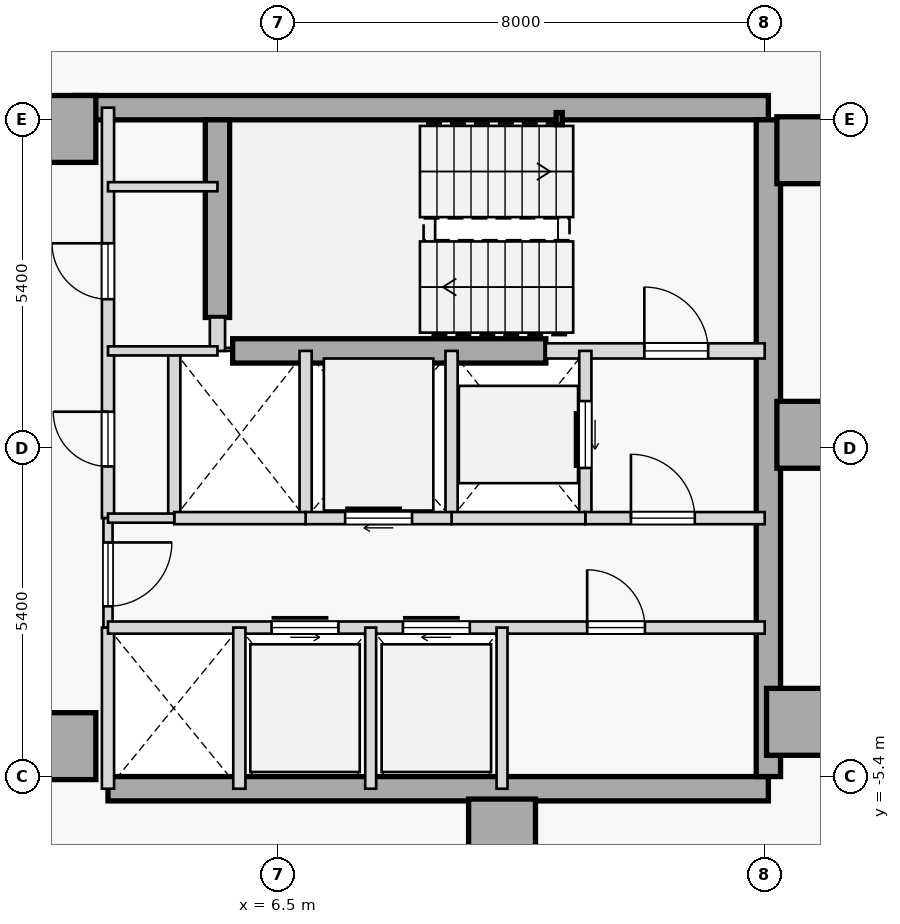
"""IFC4 building model, lengths in metres.
Left out: names, types, materials, properties, quantities, classifications, styles, units other than length and angle.
Written with IfcOpenShell. Run it as: python <this file> out.ifc"""

import sys

from ifc_helpers import new_model, si_unit, direction, frame, frame_2d, origin, origin_2d, place, context, subcontext, project, spatial, rectangle, hollow_rectangle, extrude, element, fill, save


model = new_model("IFC4")
c1 = context("Model", 3, precision=1e-05, world=origin(), true_north=direction((0.0, 1.0)))
c2 = subcontext(c1, "Body", "Model", "MODEL_VIEW")
j1 = project(units=[si_unit("LENGTHUNIT", "METRE"), si_unit("PLANEANGLEUNIT", "RADIAN")], contexts=[c1])
p1 = place(None, origin())
s1 = spatial("IfcSite", under=j1, at=p1, CompositionType="ELEMENT")
p2 = place(p1, origin())
s2 = spatial("IfcBuilding", under=s1, at=p2, CompositionType="ELEMENT")
p3 = place(p2, frame((0.0, 0.0, 178.6)))
s3 = spatial("IfcBuildingStorey", under=s2, at=p3, CompositionType="ELEMENT", Elevation=178.6)
for number, where, z_axis, x_axis in (
    (1, (15.25, 4.9, 0.0), (0.0, 0.0, 1.0), (1.0, 0.0, 0.0)),
    (2, (15.25, 0.22, 0.0), (0.0, 0.0, 1.0), (1.0, 0.0, 0.0)),
    (3, (15.08, -4.5, 0.0), (0.0, 0.0, 1.0), (1.0, 0.0, 0.0)),
    (4, (10.18, -6.32, 0.0), (0.0, 0.0, 1.0), (1.0, 0.0, 0.0)),
    (5, (2.95, -4.9, 0.0), (0.0, 0.0, 1.0), (1.0, 0.0, 0.0)),
    (6, (2.95, 5.25, 0.0), (0.0, 0.0, 1.0), (1.0, 0.0, 0.0)),
):
    element("IfcColumn", number, at=place(p3, frame(where, z_axis=z_axis, x_axis=x_axis)), inside=s3, PredefinedType="COLUMN", context=c2, shape_type="SweptSolid", body=[
        extrude(rectangle(XDim=1.1, YDim=1.1, at=origin_2d()), origin(), (0.0, 0.0, 1.0), 3.4),
    ])
p4 = place(p3, frame((3.15, 5.6, 0.0), z_axis=(0.0, 0.0, 1.0), x_axis=(1.0, 0.0, 0.0)))
e7 = element("IfcWall", 7, at=p4, inside=s3, PredefinedType="SHEAR", context=c2, shape_type="SweptSolid", body=[
    extrude(rectangle(XDim=11.41, YDim=0.4, at=frame_2d((5.705, 0.0))), origin(), (0.0, 0.0, 1.0), 3.175),
])
p5 = place(p3, frame((3.7, -5.6, 0.0), z_axis=(0.0, 0.0, 1.0), x_axis=(1.0, 0.0, 0.0)))
e8 = element("IfcWall", 8, at=p5, inside=s3, PredefinedType="SHEAR", context=c2, shape_type="SweptSolid", body=[
    extrude(rectangle(XDim=10.86, YDim=0.4, at=frame_2d((5.43, 0.0))), origin(), (0.0, 0.0, 1.0), 3.175),
])
p6 = place(p3, frame((14.56, -5.4, 0.0), z_axis=(0.0, 0.0, 1.0), x_axis=(0.0, 1.0, 0.0)))
e9 = element("IfcWall", 9, at=p6, inside=s3, PredefinedType="SHEAR", context=c2, shape_type="SweptSolid", body=[
    extrude(rectangle(XDim=10.8, YDim=0.4, at=frame_2d((5.4, 0.0))), origin(), (0.0, 0.0, 1.0), 3.175),
])
p7 = place(p3, frame((5.5, 2.15, 0.0), z_axis=(0.0, 0.0, 1.0), x_axis=(0.0, 1.0, 0.0)))
e10 = element("IfcWall", 10, at=p7, inside=s3, PredefinedType="SHEAR", context=c2, shape_type="SweptSolid", body=[
    extrude(rectangle(XDim=3.25, YDim=0.4, at=frame_2d((1.625, 0.0))), origin(), (0.0, 0.0, 1.0), 3.175),
])
p8 = place(p3, frame((5.75, 1.6, 0.0), z_axis=(0.0, 0.0, 1.0), x_axis=(1.0, 0.0, 0.0)))
e11 = element("IfcWall", 11, at=p8, inside=s3, PredefinedType="SHEAR", context=c2, shape_type="SweptSolid", body=[
    extrude(rectangle(XDim=5.15, YDim=0.4, at=frame_2d((2.575, 0.0))), origin(), (0.0, 0.0, 1.0), 3.175),
])
p9 = place(p3, frame((11.12, 5.42, 0.0), z_axis=(0.0, 0.0, 1.0), x_axis=(1.0, 0.0, 0.0)))
e12 = element("IfcColumn", 12, at=p9, inside=s3, PredefinedType="COLUMN", context=c2, shape_type="SweptSolid", body=[
    extrude(hollow_rectangle(XDim=0.1, YDim=0.2, WallThickness=0.008, at=origin_2d()), origin(), (0.0, 0.0, 1.0), 3.4),
])
p10 = place(p3, frame((10.9, 1.6, 0.0), z_axis=(0.0, 0.0, 1.0), x_axis=(1.0, 0.0, 0.0)))
e13 = element("IfcWall", 13, at=p10, inside=s3, PredefinedType="STANDARD", context=c2, shape_type="SweptSolid", body=[
    extrude(rectangle(XDim=3.6, YDim=0.25, at=frame_2d((1.8, 0.0))), origin(), (0.0, 0.0, 1.0), 3.175),
])
p11 = place(p10, frame((1.62, 0.0, 0.0)))
e14 = element("IfcOpeningElement", 14, at=p11, cuts=e13, PredefinedType="OPENING", context=c2, shape_type="SweptSolid", body=[
    extrude(rectangle(XDim=1.05, YDim=2.15, at=frame_2d((0.525, 1.075))), frame((0.0, 0.135, 0.0), z_axis=(0.0, -1.0, 0.0), x_axis=(1.0, 0.0, 0.0)), (0.0, 0.0, 1.0), 0.27),
])
p12 = place(p3, frame((5.5, 1.6, 0.0), z_axis=(0.0, 0.0, 1.0), x_axis=(0.0, 1.0, 0.0)))
e15 = element("IfcWall", 15, at=p12, inside=s3, PredefinedType="STANDARD", context=c2, shape_type="SweptSolid", body=[
    extrude(rectangle(XDim=0.55, YDim=0.25, at=frame_2d((0.275, 0.0))), origin(), (0.0, 0.0, 1.0), 3.175),
])
p13 = place(p3, frame((3.7, -1.15, 0.0), z_axis=(0.0, 0.0, 1.0), x_axis=(0.0, 1.0, 0.0)))
e16 = element("IfcWall", 16, at=p13, inside=s3, PredefinedType="STANDARD", context=c2, shape_type="SweptSolid", body=[
    extrude(rectangle(XDim=6.75, YDim=0.2, at=frame_2d((3.375, 0.0))), origin(), (0.0, 0.0, 1.0), 3.175),
])
p14 = place(p13, frame((3.6, 0.0, 0.0)))
e17 = element("IfcOpeningElement", 17, at=p14, cuts=e16, PredefinedType="OPENING", context=c2, shape_type="SweptSolid", body=[
    extrude(rectangle(XDim=0.92, YDim=2.15, at=frame_2d((0.46, 1.075))), frame((0.0, 0.11, 0.0), z_axis=(0.0, -1.0, 0.0), x_axis=(1.0, 0.0, 0.0)), (0.0, 0.0, 1.0), 0.22),
])
p15 = place(p13, frame((0.85, 0.0, 0.0)))
e18 = element("IfcOpeningElement", 18, at=p15, cuts=e16, PredefinedType="OPENING", context=c2, shape_type="SweptSolid", body=[
    extrude(rectangle(XDim=0.9, YDim=2.15, at=frame_2d((0.45, 1.075))), frame((0.0, 0.11, 0.0), z_axis=(0.0, -1.0, 0.0), x_axis=(1.0, 0.0, 0.0)), (0.0, 0.0, 1.0), 0.22),
])
p16 = place(p3, frame((3.7, -2.95, 0.0), z_axis=(0.0, 0.0, 1.0), x_axis=(0.0, 1.0, 0.0)))
e19 = element("IfcWall", 19, at=p16, inside=s3, PredefinedType="PARTITIONING", context=c2, shape_type="SweptSolid", body=[
    extrude(rectangle(XDim=1.8, YDim=0.15, at=frame_2d((0.9, 0.0))), origin(), (0.0, 0.0, 1.0), 3.175),
])
p17 = place(p16, frame((0.35, 0.0, 0.0)))
e20 = element("IfcOpeningElement", 20, at=p17, cuts=e19, PredefinedType="OPENING", context=c2, shape_type="SweptSolid", body=[
    extrude(rectangle(XDim=1.05, YDim=2.18, at=frame_2d((0.525, 1.09))), frame((0.0, 0.085, 0.0), z_axis=(0.0, -1.0, 0.0), x_axis=(1.0, 0.0, 0.0)), (0.0, 0.0, 1.0), 0.17),
])
p18 = place(p3, frame((3.7, -5.6, 0.0), z_axis=(0.0, 0.0, 1.0), x_axis=(0.0, 1.0, 0.0)))
e21 = element("IfcWall", 21, at=p18, inside=s3, PredefinedType="STANDARD", context=c2, shape_type="SweptSolid", body=[
    extrude(rectangle(XDim=2.65, YDim=0.2, at=frame_2d((1.325, 0.0))), origin(), (0.0, 0.0, 1.0), 3.175),
])
p19 = place(p3, frame((11.55, -1.15, 0.0), z_axis=(0.0, 0.0, 1.0), x_axis=(0.0, 1.0, 0.0)))
e22 = element("IfcWall", 22, at=p19, inside=s3, PredefinedType="STANDARD", context=c2, shape_type="SweptSolid", body=[
    extrude(rectangle(XDim=2.75, YDim=0.2, at=frame_2d((1.375, 0.0))), origin(), (0.0, 0.0, 1.0), 3.175),
])
p20 = place(p19, frame((0.825, 0.0, 0.0)))
e23 = element("IfcOpeningElement", 23, at=p20, cuts=e22, PredefinedType="OPENING", context=c2, shape_type="SweptSolid", body=[
    extrude(rectangle(XDim=1.1, YDim=2.15, at=frame_2d((0.55, 1.075))), frame((0.0, 0.11, 0.0), z_axis=(0.0, -1.0, 0.0), x_axis=(1.0, 0.0, 0.0)), (0.0, 0.0, 1.0), 0.22),
])
p21 = place(p3, frame((9.35, -1.15, 0.0), z_axis=(0.0, 0.0, 1.0), x_axis=(0.0, 1.0, 0.0)))
e24 = element("IfcWall", 24, at=p21, inside=s3, PredefinedType="STANDARD", context=c2, shape_type="SweptSolid", body=[
    extrude(rectangle(XDim=2.75, YDim=0.2, at=frame_2d((1.375, 0.0))), origin(), (0.0, 0.0, 1.0), 3.175),
])
p22 = place(p3, frame((11.55, -1.15, 0.0), z_axis=(0.0, 0.0, 1.0), x_axis=(1.0, 0.0, 0.0)))
e25 = element("IfcWall", 25, at=p22, inside=s3, PredefinedType="STANDARD", context=c2, shape_type="SweptSolid", body=[
    extrude(rectangle(XDim=2.95, YDim=0.2, at=frame_2d((1.475, 0.0))), origin(), (0.0, 0.0, 1.0), 3.175),
])
p23 = place(p22, frame((0.75, 0.0, 0.0)))
e26 = element("IfcOpeningElement", 26, at=p23, cuts=e25, PredefinedType="OPENING", context=c2, shape_type="SweptSolid", body=[
    extrude(rectangle(XDim=1.05, YDim=2.18, at=frame_2d((0.525, 1.09))), frame((0.0, 0.11, 0.0), z_axis=(0.0, -1.0, 0.0), x_axis=(1.0, 0.0, 0.0)), (0.0, 0.0, 1.0), 0.22),
])
p24 = place(p3, frame((9.35, -1.15, 0.0), z_axis=(0.0, 0.0, 1.0), x_axis=(1.0, 0.0, 0.0)))
e27 = element("IfcWall", 27, at=p24, inside=s3, PredefinedType="STANDARD", context=c2, shape_type="SweptSolid", body=[
    extrude(rectangle(XDim=2.2, YDim=0.2, at=frame_2d((1.1, 0.0))), origin(), (0.0, 0.0, 1.0), 3.175),
])
p25 = place(p3, frame((6.95, -1.15, 0.0), z_axis=(0.0, 0.0, 1.0), x_axis=(0.0, 1.0, 0.0)))
e28 = element("IfcWall", 28, at=p25, inside=s3, PredefinedType="STANDARD", context=c2, shape_type="SweptSolid", body=[
    extrude(rectangle(XDim=2.75, YDim=0.2, at=frame_2d((1.375, 0.0))), origin(), (0.0, 0.0, 1.0), 3.175),
])
p26 = place(p3, frame((6.95, -1.15, 0.0), z_axis=(0.0, 0.0, 1.0), x_axis=(1.0, 0.0, 0.0)))
e29 = element("IfcWall", 29, at=p26, inside=s3, PredefinedType="STANDARD", context=c2, shape_type="SweptSolid", body=[
    extrude(rectangle(XDim=2.4, YDim=0.2, at=frame_2d((1.2, 0.0))), origin(), (0.0, 0.0, 1.0), 3.175),
])
p27 = place(p26, frame((0.65, 0.0, 0.0)))
e30 = element("IfcOpeningElement", 30, at=p27, cuts=e29, PredefinedType="OPENING", context=c2, shape_type="SweptSolid", body=[
    extrude(rectangle(XDim=1.1, YDim=2.15, at=frame_2d((0.55, 1.075))), frame((0.0, 0.11, 0.0), z_axis=(0.0, -1.0, 0.0), x_axis=(1.0, 0.0, 0.0)), (0.0, 0.0, 1.0), 0.22),
])
p28 = place(p3, frame((4.79, -1.15, 0.0), z_axis=(0.0, 0.0, 1.0), x_axis=(0.0, 1.0, 0.0)))
e31 = element("IfcWall", 31, at=p28, inside=s3, PredefinedType="STANDARD", context=c2, shape_type="SweptSolid", body=[
    extrude(rectangle(XDim=2.75, YDim=0.2, at=frame_2d((1.375, 0.0))), origin(), (0.0, 0.0, 1.0), 3.175),
])
p29 = place(p3, frame((4.79, -1.15, 0.0), z_axis=(0.0, 0.0, 1.0), x_axis=(1.0, 0.0, 0.0)))
e32 = element("IfcWall", 32, at=p29, inside=s3, PredefinedType="STANDARD", context=c2, shape_type="SweptSolid", body=[
    extrude(rectangle(XDim=2.16, YDim=0.2, at=frame_2d((1.08, 0.0))), origin(), (0.0, 0.0, 1.0), 3.175),
])
p30 = place(p3, frame((3.7, -1.15, 0.0), z_axis=(0.0, 0.0, 1.0), x_axis=(1.0, 0.0, 0.0)))
e33 = element("IfcWall", 33, at=p30, inside=s3, PredefinedType="PARTITIONING", context=c2, shape_type="SweptSolid", body=[
    extrude(rectangle(XDim=1.09, YDim=0.15, at=frame_2d((0.545, 0.0))), origin(), (0.0, 0.0, 1.0), 3.175),
])
p31 = place(p3, frame((3.7, -2.95, 0.0), z_axis=(0.0, 0.0, 1.0), x_axis=(1.0, 0.0, 0.0)))
e34 = element("IfcWall", 34, at=p31, inside=s3, PredefinedType="STANDARD", context=c2, shape_type="SweptSolid", body=[
    extrude(rectangle(XDim=10.8, YDim=0.2, at=frame_2d((5.4, 0.0))), origin(), (0.0, 0.0, 1.0), 3.175),
])
p32 = place(p31, frame((2.69, 0.0, 0.0)))
e35 = element("IfcOpeningElement", 35, at=p32, cuts=e34, PredefinedType="OPENING", context=c2, shape_type="SweptSolid", body=[
    extrude(rectangle(XDim=1.1, YDim=2.15, at=frame_2d((0.55, 1.075))), frame((0.0, 0.11, 0.0), z_axis=(0.0, -1.0, 0.0), x_axis=(1.0, 0.0, 0.0)), (0.0, 0.0, 1.0), 0.22),
])
p33 = place(p31, frame((4.85, 0.0, 0.0)))
e36 = element("IfcOpeningElement", 36, at=p33, cuts=e34, PredefinedType="OPENING", context=c2, shape_type="SweptSolid", body=[
    extrude(rectangle(XDim=1.1, YDim=2.15, at=frame_2d((0.55, 1.075))), frame((0.0, 0.11, 0.0), z_axis=(0.0, -1.0, 0.0), x_axis=(1.0, 0.0, 0.0)), (0.0, 0.0, 1.0), 0.22),
])
p34 = place(p31, frame((7.88, 0.0, 0.0)))
e37 = element("IfcOpeningElement", 37, at=p34, cuts=e34, PredefinedType="OPENING", context=c2, shape_type="SweptSolid", body=[
    extrude(rectangle(XDim=0.95, YDim=2.15, at=frame_2d((0.475, 1.075))), frame((0.0, 0.11, 0.0), z_axis=(0.0, -1.0, 0.0), x_axis=(1.0, 0.0, 0.0)), (0.0, 0.0, 1.0), 0.22),
])
p35 = place(p3, frame((5.86, -5.6, 0.0), z_axis=(0.0, 0.0, 1.0), x_axis=(0.0, 1.0, 0.0)))
e38 = element("IfcWall", 38, at=p35, inside=s3, PredefinedType="STANDARD", context=c2, shape_type="SweptSolid", body=[
    extrude(rectangle(XDim=2.65, YDim=0.2, at=frame_2d((1.325, 0.0))), origin(), (0.0, 0.0, 1.0), 3.175),
])
for number, where, z_axis, x_axis in (
    (39, (10.18, -5.6, 0.0), (0.0, 0.0, 1.0), (0.0, 1.0, 0.0)),
    (40, (8.02, -5.6, 0.0), (0.0, 0.0, 1.0), (0.0, 1.0, 0.0)),
):
    element("IfcWall", number, at=place(p3, frame(where, z_axis=z_axis, x_axis=x_axis)), inside=s3, PredefinedType="STANDARD", context=c2, shape_type="SweptSolid", body=[
        extrude(rectangle(XDim=2.65, YDim=0.18, at=frame_2d((1.325, 0.0))), origin(), (0.0, 0.0, 1.0), 3.175),
    ])
for number, where, z_axis, x_axis in (
    (41, (3.7, 4.3, 0.0), (0.0, 0.0, 1.0), (1.0, 0.0, 0.0)),
    (42, (3.7, 1.6, 0.0), (0.0, 0.0, 1.0), (1.0, 0.0, 0.0)),
):
    element("IfcWall", number, at=place(p3, frame(where, z_axis=z_axis, x_axis=x_axis)), inside=s3, PredefinedType="PARTITIONING", context=c2, shape_type="SweptSolid", body=[
        extrude(rectangle(XDim=1.8, YDim=0.15, at=frame_2d((0.9, 0.0))), origin(), (0.0, 0.0, 1.0), 3.175),
    ])
p36 = place(p11, origin())
e43 = element("IfcDoor", 43, at=p36, inside=s3, OperationType="SINGLE_SWING_LEFT", PredefinedType="DOOR", context=c2, shape_type="SweptSolid", body=[
    extrude(rectangle(XDim=1.05, YDim=2.15, at=frame_2d((0.525, 1.075))), frame((0.0, 0.025, 0.0), z_axis=(0.0, -1.0, 0.0), x_axis=(1.0, 0.0, 0.0)), (0.0, 0.0, 1.0), 0.05),
])
fill(e14, e43)
p37 = place(p23, origin())
e44 = element("IfcDoor", 44, at=p37, inside=s3, OperationType="SINGLE_SWING_LEFT", PredefinedType="DOOR", context=c2, shape_type="SweptSolid", body=[
    extrude(rectangle(XDim=1.05, YDim=2.18, at=frame_2d((0.525, 1.09))), frame((0.0, 0.025, 0.0), z_axis=(0.0, -1.0, 0.0), x_axis=(1.0, 0.0, 0.0)), (0.0, 0.0, 1.0), 0.05),
])
fill(e26, e44)
p38 = place(p17, frame((1.05, 0.0, 0.0), z_axis=(0.0, 0.0, 1.0), x_axis=(-1.0, 0.0, 0.0)))
e45 = element("IfcDoor", 45, at=p38, inside=s3, OperationType="SINGLE_SWING_RIGHT", PredefinedType="DOOR", context=c2, shape_type="SweptSolid", body=[
    extrude(rectangle(XDim=1.05, YDim=2.18, at=frame_2d((0.525, 1.09))), frame((0.0, 0.025, 0.0), z_axis=(0.0, -1.0, 0.0), x_axis=(1.0, 0.0, 0.0)), (0.0, 0.0, 1.0), 0.05),
])
fill(e20, e45)
p39 = place(p20, origin())
e46 = element("IfcDoor", 46, at=p39, inside=s3, OperationType="SLIDING_TO_RIGHT", PredefinedType="DOOR", context=c2, shape_type="SweptSolid", body=[
    extrude(rectangle(XDim=1.1, YDim=2.15, at=frame_2d((0.55, 1.075))), frame((0.0, 0.025, 0.0), z_axis=(0.0, -1.0, 0.0), x_axis=(1.0, 0.0, 0.0)), (0.0, 0.0, 1.0), 0.05),
])
fill(e23, e46)
p40 = place(p27, origin())
e47 = element("IfcDoor", 47, at=p40, inside=s3, OperationType="SLIDING_TO_RIGHT", PredefinedType="DOOR", context=c2, shape_type="SweptSolid", body=[
    extrude(rectangle(XDim=1.1, YDim=2.15, at=frame_2d((0.55, 1.075))), frame((0.0, 0.025, 0.0), z_axis=(0.0, -1.0, 0.0), x_axis=(1.0, 0.0, 0.0)), (0.0, 0.0, 1.0), 0.05),
])
fill(e30, e47)
p41 = place(p32, origin())
e48 = element("IfcDoor", 48, at=p41, inside=s3, OperationType="SLIDING_TO_LEFT", PredefinedType="DOOR", context=c2, shape_type="SweptSolid", body=[
    extrude(rectangle(XDim=1.1, YDim=2.15, at=frame_2d((0.55, 1.075))), frame((0.0, 0.025, 0.0), z_axis=(0.0, -1.0, 0.0), x_axis=(1.0, 0.0, 0.0)), (0.0, 0.0, 1.0), 0.05),
])
fill(e35, e48)
p42 = place(p33, origin())
e49 = element("IfcDoor", 49, at=p42, inside=s3, OperationType="SLIDING_TO_RIGHT", PredefinedType="DOOR", context=c2, shape_type="SweptSolid", body=[
    extrude(rectangle(XDim=1.1, YDim=2.15, at=frame_2d((0.55, 1.075))), frame((0.0, 0.025, 0.0), z_axis=(0.0, -1.0, 0.0), x_axis=(1.0, 0.0, 0.0)), (0.0, 0.0, 1.0), 0.05),
])
fill(e36, e49)
p43 = place(p34, origin())
e50 = element("IfcDoor", 50, at=p43, inside=s3, OperationType="SINGLE_SWING_LEFT", PredefinedType="DOOR", context=c2, shape_type="SweptSolid", body=[
    extrude(rectangle(XDim=0.95, YDim=2.15, at=frame_2d((0.475, 1.075))), frame((0.0, 0.025, 0.0), z_axis=(0.0, -1.0, 0.0), x_axis=(1.0, 0.0, 0.0)), (0.0, 0.0, 1.0), 0.05),
])
fill(e37, e50)
p44 = place(p14, origin())
e51 = element("IfcDoor", 51, at=p44, inside=s3, OperationType="SINGLE_SWING_RIGHT", PredefinedType="DOOR", context=c2, shape_type="SweptSolid", body=[
    extrude(rectangle(XDim=0.92, YDim=2.15, at=frame_2d((0.46, 1.075))), frame((0.0, 0.025, 0.0), z_axis=(0.0, -1.0, 0.0), x_axis=(1.0, 0.0, 0.0)), (0.0, 0.0, 1.0), 0.05),
])
fill(e17, e51)
p45 = place(p15, origin())
e52 = element("IfcDoor", 52, at=p45, inside=s3, OperationType="SINGLE_SWING_RIGHT", PredefinedType="DOOR", context=c2, shape_type="SweptSolid", body=[
    extrude(rectangle(XDim=0.9, YDim=2.15, at=frame_2d((0.45, 1.075))), frame((0.0, 0.025, 0.0), z_axis=(0.0, -1.0, 0.0), x_axis=(1.0, 0.0, 0.0)), (0.0, 0.0, 1.0), 0.05),
])
fill(e18, e52)
save(model, sys.argv[1])
